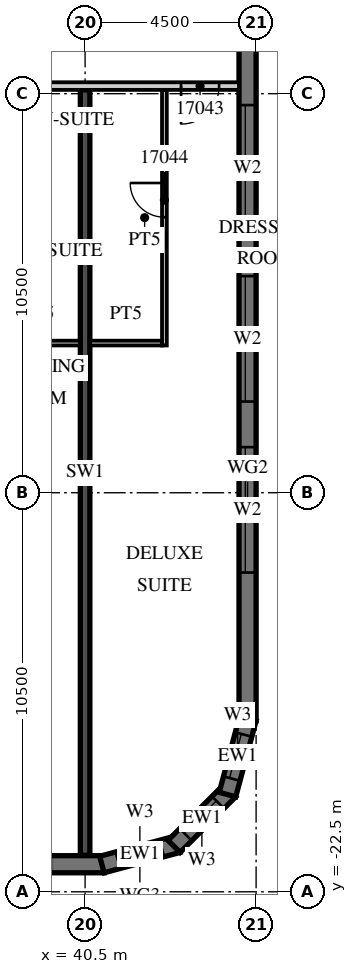
"""IFC4 building model, lengths in metres.
Left out: names, types, materials, properties, quantities, classifications, styles, units other than length and angle.
Written with IfcOpenShell. Run it as: python <this file> out.ifc"""

import sys

from ifc_helpers import new_model, si_unit, direction, frame, frame_2d, origin, place, context, subcontext, project, spatial, polyline, rectangle, outline, extrude, element, fill, save


model = new_model("IFC4")
c1 = context("Model", 3, precision=1e-05, world=origin(), true_north=direction((0.0, 1.0)))
c2 = subcontext(c1, "Body", "Model", "MODEL_VIEW")
j1 = project(units=[si_unit("LENGTHUNIT", "METRE"), si_unit("PLANEANGLEUNIT", "RADIAN")], contexts=[c1])
p1 = place(None, origin())
s1 = spatial("IfcSite", under=j1, at=p1, CompositionType="ELEMENT")
p2 = place(p1, origin())
s2 = spatial("IfcBuilding", under=s1, at=p2, CompositionType="ELEMENT")
p3 = place(p2, frame((0.0, 0.0, 86.4)))
s3 = spatial("IfcBuildingStorey", under=s2, at=p3, CompositionType="ELEMENT", Elevation=86.4)
p4 = place(p3, frame((40.5, -21.54, 0.0), z_axis=(0.0, 0.0, 1.0), x_axis=(0.0, 1.0, 0.0)))
e1 = element("IfcWall", 1, at=p4, inside=s3, PredefinedType="SHEAR", context=c2, shape_type="SweptSolid", body=[
    extrude(rectangle(XDim=20.14, YDim=0.25, at=frame_2d((10.07, 0.0))), origin(), (0.0, 0.0, 1.0), 3.3),
])
p5 = place(p3, frame((-13.5, -21.775, 0.0), z_axis=(0.0, 0.0, 1.0), x_axis=(1.0, 0.0, 0.0)))
e2 = element("IfcWall", 2, at=p5, inside=s3, PredefinedType="SOLIDWALL", context=c2, shape_type="SweptSolid", body=[
    extrude(rectangle(XDim=54.5, YDim=0.45, at=frame_2d((27.25, 0.0))), origin(), (0.0, 0.0, 1.0), 3.02),
])
p6 = place(p5, frame((0.9, 0.0, 0.45)))
e3 = element("IfcOpeningElement", 3, at=p6, cuts=e2, PredefinedType="OPENING", context=c2, shape_type="SweptSolid", body=[
    extrude(rectangle(XDim=2.7, YDim=2.25, at=frame_2d((1.35, 1.125))), frame((0.0, 0.235, 0.0), z_axis=(0.0, -1.0, 0.0), x_axis=(1.0, 0.0, 0.0)), (0.0, 0.0, 1.0), 0.47),
])
p7 = place(p5, frame((5.4, 0.0, 0.45)))
e4 = element("IfcOpeningElement", 4, at=p7, cuts=e2, PredefinedType="OPENING", context=c2, shape_type="SweptSolid", body=[
    extrude(rectangle(XDim=2.7, YDim=2.25, at=frame_2d((1.35, 1.125))), frame((0.0, 0.235, 0.0), z_axis=(0.0, -1.0, 0.0), x_axis=(1.0, 0.0, 0.0)), (0.0, 0.0, 1.0), 0.47),
])
p8 = place(p5, frame((9.9, 0.0, 0.45)))
e5 = element("IfcOpeningElement", 5, at=p8, cuts=e2, PredefinedType="OPENING", context=c2, shape_type="SweptSolid", body=[
    extrude(rectangle(XDim=2.7, YDim=2.25, at=frame_2d((1.35, 1.125))), frame((0.0, 0.235, 0.0), z_axis=(0.0, -1.0, 0.0), x_axis=(1.0, 0.0, 0.0)), (0.0, 0.0, 1.0), 0.47),
])
p9 = place(p5, frame((14.4, 0.0, 0.45)))
e6 = element("IfcOpeningElement", 6, at=p9, cuts=e2, PredefinedType="OPENING", context=c2, shape_type="SweptSolid", body=[
    extrude(rectangle(XDim=2.7, YDim=2.25, at=frame_2d((1.35, 1.125))), frame((0.0, 0.235, 0.0), z_axis=(0.0, -1.0, 0.0), x_axis=(1.0, 0.0, 0.0)), (0.0, 0.0, 1.0), 0.47),
])
p10 = place(p5, frame((18.9, 0.0, 0.45)))
e7 = element("IfcOpeningElement", 7, at=p10, cuts=e2, PredefinedType="OPENING", context=c2, shape_type="SweptSolid", body=[
    extrude(rectangle(XDim=2.7, YDim=2.25, at=frame_2d((1.35, 1.125))), frame((0.0, 0.235, 0.0), z_axis=(0.0, -1.0, 0.0), x_axis=(1.0, 0.0, 0.0)), (0.0, 0.0, 1.0), 0.47),
])
p11 = place(p5, frame((23.4, 0.0, 0.45)))
e8 = element("IfcOpeningElement", 8, at=p11, cuts=e2, PredefinedType="OPENING", context=c2, shape_type="SweptSolid", body=[
    extrude(rectangle(XDim=2.7, YDim=2.25, at=frame_2d((1.35, 1.125))), frame((0.0, 0.235, 0.0), z_axis=(0.0, -1.0, 0.0), x_axis=(1.0, 0.0, 0.0)), (0.0, 0.0, 1.0), 0.47),
])
p12 = place(p5, frame((27.9, 0.0, 0.45)))
e9 = element("IfcOpeningElement", 9, at=p12, cuts=e2, PredefinedType="OPENING", context=c2, shape_type="SweptSolid", body=[
    extrude(rectangle(XDim=2.7, YDim=2.25, at=frame_2d((1.35, 1.125))), frame((0.0, 0.235, 0.0), z_axis=(0.0, -1.0, 0.0), x_axis=(1.0, 0.0, 0.0)), (0.0, 0.0, 1.0), 0.47),
])
p13 = place(p5, frame((32.4, 0.0, 0.45)))
e10 = element("IfcOpeningElement", 10, at=p13, cuts=e2, PredefinedType="OPENING", context=c2, shape_type="SweptSolid", body=[
    extrude(rectangle(XDim=2.7, YDim=2.25, at=frame_2d((1.35, 1.125))), frame((0.0, 0.235, 0.0), z_axis=(0.0, -1.0, 0.0), x_axis=(1.0, 0.0, 0.0)), (0.0, 0.0, 1.0), 0.47),
])
p14 = place(p5, frame((36.9, 0.0, 0.45)))
e11 = element("IfcOpeningElement", 11, at=p14, cuts=e2, PredefinedType="OPENING", context=c2, shape_type="SweptSolid", body=[
    extrude(rectangle(XDim=2.7, YDim=2.25, at=frame_2d((1.35, 1.125))), frame((0.0, 0.235, 0.0), z_axis=(0.0, -1.0, 0.0), x_axis=(1.0, 0.0, 0.0)), (0.0, 0.0, 1.0), 0.47),
])
p15 = place(p5, frame((41.4, 0.0, 0.45)))
e12 = element("IfcOpeningElement", 12, at=p15, cuts=e2, PredefinedType="OPENING", context=c2, shape_type="SweptSolid", body=[
    extrude(rectangle(XDim=2.7, YDim=2.25, at=frame_2d((1.35, 1.125))), frame((0.0, 0.235, 0.0), z_axis=(0.0, -1.0, 0.0), x_axis=(1.0, 0.0, 0.0)), (0.0, 0.0, 1.0), 0.47),
])
p16 = place(p5, frame((45.9, 0.0, 0.45)))
e13 = element("IfcOpeningElement", 13, at=p16, cuts=e2, PredefinedType="OPENING", context=c2, shape_type="SweptSolid", body=[
    extrude(rectangle(XDim=2.7, YDim=2.25, at=frame_2d((1.35, 1.125))), frame((0.0, 0.235, 0.0), z_axis=(0.0, -1.0, 0.0), x_axis=(1.0, 0.0, 0.0)), (0.0, 0.0, 1.0), 0.47),
])
p17 = place(p5, frame((50.4, 0.0, 0.45)))
e14 = element("IfcOpeningElement", 14, at=p17, cuts=e2, PredefinedType="OPENING", context=c2, shape_type="SweptSolid", body=[
    extrude(rectangle(XDim=2.7, YDim=2.25, at=frame_2d((1.35, 1.125))), frame((0.0, 0.235, 0.0), z_axis=(0.0, -1.0, 0.0), x_axis=(1.0, 0.0, 0.0)), (0.0, 0.0, 1.0), 0.47),
])
p18 = place(p3, frame((40.942, -21.783, 0.0), z_axis=(0.0, 0.0, 1.0), x_axis=(0.965926999034, 0.25881466832, 0.0)))
e15 = element("IfcWall", 15, at=p18, inside=s3, PredefinedType="SOLIDWALL", context=c2, shape_type="SweptSolid", body=[
    extrude(outline(polyline([(0.0, -0.225), (2.071, -0.225), (1.95, 0.225), (0.121, 0.225), (0.0, -0.225)])), origin(), (0.0, 0.0, 1.0), 3.02),
])
p19 = place(p18, frame((0.435, 0.0, 0.45)))
e16 = element("IfcOpeningElement", 16, at=p19, cuts=e15, PredefinedType="OPENING", context=c2, shape_type="SweptSolid", body=[
    extrude(rectangle(XDim=1.2, YDim=2.25, at=frame_2d((0.6, 1.125))), frame((0.0, 0.235, 0.0), z_axis=(0.0, -1.0, 0.0), x_axis=(1.0, 0.0, 0.0)), (0.0, 0.0, 1.0), 0.47),
])
p20 = place(p3, frame((42.841, -21.305, 0.0), z_axis=(0.0, 0.0, 1.0), x_axis=(0.707106781187, 0.707106781187, 0.0)))
e17 = element("IfcWall", 17, at=p20, inside=s3, PredefinedType="SOLIDWALL", context=c2, shape_type="SweptSolid", body=[
    extrude(outline(polyline([(0.0, -0.225), (2.071, -0.225), (1.95, 0.225), (0.121, 0.225), (0.0, -0.225)])), origin(), (0.0, 0.0, 1.0), 3.02),
])
p21 = place(p20, frame((0.435, 0.0, 0.45)))
e18 = element("IfcOpeningElement", 18, at=p21, cuts=e17, PredefinedType="OPENING", context=c2, shape_type="SweptSolid", body=[
    extrude(rectangle(XDim=1.2, YDim=2.25, at=frame_2d((0.6, 1.125))), frame((0.0, 0.235, 0.0), z_axis=(0.0, -1.0, 0.0), x_axis=(1.0, 0.0, 0.0)), (0.0, 0.0, 1.0), 0.47),
])
p22 = place(p3, frame((44.247, -19.942, 0.0), z_axis=(0.0, 0.0, 1.0), x_axis=(0.25881466832, 0.965926999034, 0.0)))
e19 = element("IfcWall", 19, at=p22, inside=s3, PredefinedType="SOLIDWALL", context=c2, shape_type="SweptSolid", body=[
    extrude(outline(polyline([(-0.0, -0.225), (2.07, -0.225), (1.95, 0.225), (0.12, 0.225), (-0.0, -0.225)])), origin(), (0.0, 0.0, 1.0), 3.02),
])
p23 = place(p22, frame((0.435, 0.0, 0.45)))
e20 = element("IfcOpeningElement", 20, at=p23, cuts=e19, PredefinedType="OPENING", context=c2, shape_type="SweptSolid", body=[
    extrude(rectangle(XDim=1.2, YDim=2.25, at=frame_2d((0.6, 1.125))), frame((0.0, 0.235, 0.0), z_axis=(0.0, -1.0, 0.0), x_axis=(1.0, 0.0, 0.0)), (0.0, 0.0, 1.0), 0.47),
])
p24 = place(p3, frame((44.775, -18.0, 0.0), z_axis=(0.0, 0.0, 1.0), x_axis=(0.0, 1.0, 0.0)))
e21 = element("IfcWall", 21, at=p24, inside=s3, PredefinedType="SOLIDWALL", context=c2, shape_type="SweptSolid", body=[
    extrude(rectangle(XDim=36.0, YDim=0.45, at=frame_2d((18.0, 0.0))), origin(), (0.0, 0.0, 1.0), 3.02),
])
p25 = place(p24, frame((3.9, 0.0, 0.45)))
e22 = element("IfcOpeningElement", 22, at=p25, cuts=e21, PredefinedType="OPENING", context=c2, shape_type="SweptSolid", body=[
    extrude(rectangle(XDim=3.3, YDim=2.25, at=frame_2d((1.65, 1.125))), frame((0.0, 0.235, 0.0), z_axis=(0.0, -1.0, 0.0), x_axis=(1.0, 0.0, 0.0)), (0.0, 0.0, 1.0), 0.47),
])
p26 = place(p24, frame((8.4, 0.0, 0.45)))
e23 = element("IfcOpeningElement", 23, at=p26, cuts=e21, PredefinedType="OPENING", context=c2, shape_type="SweptSolid", body=[
    extrude(rectangle(XDim=3.3, YDim=2.25, at=frame_2d((1.65, 1.125))), frame((0.0, 0.235, 0.0), z_axis=(0.0, -1.0, 0.0), x_axis=(1.0, 0.0, 0.0)), (0.0, 0.0, 1.0), 0.47),
])
p27 = place(p24, frame((12.9, 0.0, 0.45)))
e24 = element("IfcOpeningElement", 24, at=p27, cuts=e21, PredefinedType="OPENING", context=c2, shape_type="SweptSolid", body=[
    extrude(rectangle(XDim=3.3, YDim=2.25, at=frame_2d((1.65, 1.125))), frame((0.0, 0.235, 0.0), z_axis=(0.0, -1.0, 0.0), x_axis=(1.0, 0.0, 0.0)), (0.0, 0.0, 1.0), 0.47),
])
p28 = place(p3, frame((-13.5, -1.3, 0.0), z_axis=(0.0, 0.0, 1.0), x_axis=(1.0, 0.0, 0.0)))
e25 = element("IfcWall", 25, at=p28, inside=s3, PredefinedType="PARTITIONING", context=c2, shape_type="SweptSolid", body=[
    extrude(rectangle(XDim=58.05, YDim=0.2, at=frame_2d((29.025, 0.0))), origin(), (0.0, 0.0, 1.0), 3.02),
])
p29 = place(p28, frame((2.925, 0.0, 0.0)))
e26 = element("IfcOpeningElement", 26, at=p29, cuts=e25, PredefinedType="OPENING", context=c2, shape_type="SweptSolid", body=[
    extrude(rectangle(XDim=1.0, YDim=2.1, at=frame_2d((0.5, 1.05))), frame((0.0, 0.11, 0.0), z_axis=(0.0, -1.0, 0.0), x_axis=(1.0, 0.0, 0.0)), (0.0, 0.0, 1.0), 0.22),
])
p30 = place(p28, frame((5.075, 0.0, 0.0)))
e27 = element("IfcOpeningElement", 27, at=p30, cuts=e25, PredefinedType="OPENING", context=c2, shape_type="SweptSolid", body=[
    extrude(rectangle(XDim=1.0, YDim=2.1, at=frame_2d((0.5, 1.05))), frame((0.0, 0.11, 0.0), z_axis=(0.0, -1.0, 0.0), x_axis=(1.0, 0.0, 0.0)), (0.0, 0.0, 1.0), 0.22),
])
p31 = place(p28, frame((9.55, 0.0, 0.0)))
e28 = element("IfcOpeningElement", 28, at=p31, cuts=e25, PredefinedType="OPENING", context=c2, shape_type="SweptSolid", body=[
    extrude(rectangle(XDim=1.0, YDim=2.1, at=frame_2d((0.5, 1.05))), frame((0.0, 0.11, 0.0), z_axis=(0.0, -1.0, 0.0), x_axis=(1.0, 0.0, 0.0)), (0.0, 0.0, 1.0), 0.22),
])
p32 = place(p28, frame((14.075, 0.0, 0.0)))
e29 = element("IfcOpeningElement", 29, at=p32, cuts=e25, PredefinedType="OPENING", context=c2, shape_type="SweptSolid", body=[
    extrude(rectangle(XDim=1.0, YDim=2.1, at=frame_2d((0.5, 1.05))), frame((0.0, 0.11, 0.0), z_axis=(0.0, -1.0, 0.0), x_axis=(1.0, 0.0, 0.0)), (0.0, 0.0, 1.0), 0.22),
])
p33 = place(p28, frame((20.925, 0.0, 0.0)))
e30 = element("IfcOpeningElement", 30, at=p33, cuts=e25, PredefinedType="OPENING", context=c2, shape_type="SweptSolid", body=[
    extrude(rectangle(XDim=1.0, YDim=2.1, at=frame_2d((0.5, 1.05))), frame((0.0, 0.11, 0.0), z_axis=(0.0, -1.0, 0.0), x_axis=(1.0, 0.0, 0.0)), (0.0, 0.0, 1.0), 0.22),
])
p34 = place(p28, frame((27.862, 0.0, 0.0)))
e31 = element("IfcOpeningElement", 31, at=p34, cuts=e25, PredefinedType="OPENING", context=c2, shape_type="SweptSolid", body=[
    extrude(rectangle(XDim=1.2, YDim=2.1, at=frame_2d((0.6, 1.05))), frame((0.0, 0.11, 0.0), z_axis=(0.0, -1.0, 0.0), x_axis=(1.0, 0.0, 0.0)), (0.0, 0.0, 1.0), 0.22),
])
p35 = place(p28, frame((34.45, 0.0, 0.0)))
e32 = element("IfcOpeningElement", 32, at=p35, cuts=e25, PredefinedType="OPENING", context=c2, shape_type="SweptSolid", body=[
    extrude(rectangle(XDim=1.0, YDim=2.1, at=frame_2d((0.5, 1.05))), frame((0.0, 0.11, 0.0), z_axis=(0.0, -1.0, 0.0), x_axis=(1.0, 0.0, 0.0)), (0.0, 0.0, 1.0), 0.22),
])
p36 = place(p28, frame((38.925, 0.0, 0.0)))
e33 = element("IfcOpeningElement", 33, at=p36, cuts=e25, PredefinedType="OPENING", context=c2, shape_type="SweptSolid", body=[
    extrude(rectangle(XDim=1.0, YDim=2.1, at=frame_2d((0.5, 1.05))), frame((0.0, 0.11, 0.0), z_axis=(0.0, -1.0, 0.0), x_axis=(1.0, 0.0, 0.0)), (0.0, 0.0, 1.0), 0.22),
])
p37 = place(p28, frame((41.075, 0.0, 0.0)))
e34 = element("IfcOpeningElement", 34, at=p37, cuts=e25, PredefinedType="OPENING", context=c2, shape_type="SweptSolid", body=[
    extrude(rectangle(XDim=1.0, YDim=2.1, at=frame_2d((0.5, 1.05))), frame((0.0, 0.11, 0.0), z_axis=(0.0, -1.0, 0.0), x_axis=(1.0, 0.0, 0.0)), (0.0, 0.0, 1.0), 0.22),
])
p38 = place(p28, frame((45.55, 0.0, 0.0)))
e35 = element("IfcOpeningElement", 35, at=p38, cuts=e25, PredefinedType="OPENING", context=c2, shape_type="SweptSolid", body=[
    extrude(rectangle(XDim=1.0, YDim=2.1, at=frame_2d((0.5, 1.05))), frame((0.0, 0.11, 0.0), z_axis=(0.0, -1.0, 0.0), x_axis=(1.0, 0.0, 0.0)), (0.0, 0.0, 1.0), 0.22),
])
p39 = place(p28, frame((50.075, 0.0, 0.0)))
e36 = element("IfcOpeningElement", 36, at=p39, cuts=e25, PredefinedType="OPENING", context=c2, shape_type="SweptSolid", body=[
    extrude(rectangle(XDim=1.0, YDim=2.1, at=frame_2d((0.5, 1.05))), frame((0.0, 0.11, 0.0), z_axis=(0.0, -1.0, 0.0), x_axis=(1.0, 0.0, 0.0)), (0.0, 0.0, 1.0), 0.22),
])
p40 = place(p28, frame((56.525, 0.0, 0.0)))
e37 = element("IfcOpeningElement", 37, at=p40, cuts=e25, PredefinedType="OPENING", context=c2, shape_type="SweptSolid", body=[
    extrude(rectangle(XDim=1.0, YDim=2.1, at=frame_2d((0.5, 1.05))), frame((0.0, 0.11, 0.0), z_axis=(0.0, -1.0, 0.0), x_axis=(1.0, 0.0, 0.0)), (0.0, 0.0, 1.0), 0.22),
])
p41 = place(p3, frame((38.15, -8.062, 0.0), z_axis=(0.0, 0.0, 1.0), x_axis=(1.0, 0.0, 0.0)))
e38 = element("IfcWall", 38, at=p41, inside=s3, PredefinedType="PARTITIONING", context=c2, shape_type="SweptSolid", body=[
    extrude(rectangle(XDim=2.225, YDim=0.125, at=frame_2d((1.113, 0.0))), origin(), (0.0, 0.0, 1.0), 3.02),
])
p42 = place(p3, frame((42.587, -8.125, 0.0), z_axis=(0.0, 0.0, 1.0), x_axis=(0.0, 1.0, 0.0)))
e39 = element("IfcWall", 39, at=p42, inside=s3, PredefinedType="PARTITIONING", context=c2, shape_type="SweptSolid", body=[
    extrude(rectangle(XDim=6.725, YDim=0.125, at=frame_2d((3.363, 0.0))), origin(), (0.0, 0.0, 1.0), 3.02),
])
p43 = place(p42, frame((3.375, 0.0, 0.0)))
e40 = element("IfcOpeningElement", 40, at=p43, cuts=e39, PredefinedType="OPENING", context=c2, shape_type="SweptSolid", body=[
    extrude(rectangle(XDim=0.9, YDim=2.1, at=frame_2d((0.45, 1.05))), frame((0.0, 0.073, 0.0), z_axis=(0.0, -1.0, 0.0), x_axis=(1.0, 0.0, 0.0)), (0.0, 0.0, 1.0), 0.145),
])
p44 = place(p3, frame((40.625, -8.062, 0.0), z_axis=(0.0, 0.0, 1.0), x_axis=(1.0, 0.0, 0.0)))
e41 = element("IfcWall", 41, at=p44, inside=s3, PredefinedType="PARTITIONING", context=c2, shape_type="SweptSolid", body=[
    extrude(rectangle(XDim=1.9, YDim=0.125, at=frame_2d((0.95, 0.0))), origin(), (0.0, 0.0, 1.0), 3.02),
])
p45 = place(p19, origin())
e42 = element("IfcWindow", 42, at=p45, inside=s3, PartitioningType="SINGLE_PANEL", PredefinedType="WINDOW", context=c2, shape_type="SweptSolid", body=[
    extrude(rectangle(XDim=1.2, YDim=2.25, at=frame_2d((0.6, 1.125))), frame((0.0, 0.09, 0.0), z_axis=(0.0, -1.0, 0.0), x_axis=(1.0, 0.0, 0.0)), (0.0, 0.0, 1.0), 0.06),
])
fill(e16, e42)
p46 = place(p21, origin())
e43 = element("IfcWindow", 43, at=p46, inside=s3, PartitioningType="SINGLE_PANEL", PredefinedType="WINDOW", context=c2, shape_type="SweptSolid", body=[
    extrude(rectangle(XDim=1.2, YDim=2.25, at=frame_2d((0.6, 1.125))), frame((0.0, 0.09, 0.0), z_axis=(0.0, -1.0, 0.0), x_axis=(1.0, 0.0, 0.0)), (0.0, 0.0, 1.0), 0.06),
])
fill(e18, e43)
p47 = place(p23, origin())
e44 = element("IfcWindow", 44, at=p47, inside=s3, PartitioningType="SINGLE_PANEL", PredefinedType="WINDOW", context=c2, shape_type="SweptSolid", body=[
    extrude(rectangle(XDim=1.2, YDim=2.25, at=frame_2d((0.6, 1.125))), frame((0.0, 0.09, 0.0), z_axis=(0.0, -1.0, 0.0), x_axis=(1.0, 0.0, 0.0)), (0.0, 0.0, 1.0), 0.06),
])
fill(e20, e44)
p48 = place(p25, origin())
e45 = element("IfcWindow", 45, at=p48, inside=s3, PartitioningType="SINGLE_PANEL", PredefinedType="WINDOW", context=c2, shape_type="SweptSolid", body=[
    extrude(rectangle(XDim=3.3, YDim=2.25, at=frame_2d((1.65, 1.125))), frame((0.0, 0.09, 0.0), z_axis=(0.0, -1.0, 0.0), x_axis=(1.0, 0.0, 0.0)), (0.0, 0.0, 1.0), 0.06),
])
fill(e22, e45)
p49 = place(p26, origin())
e46 = element("IfcWindow", 46, at=p49, inside=s3, PartitioningType="SINGLE_PANEL", PredefinedType="WINDOW", context=c2, shape_type="SweptSolid", body=[
    extrude(rectangle(XDim=3.3, YDim=2.25, at=frame_2d((1.65, 1.125))), frame((0.0, 0.09, 0.0), z_axis=(0.0, -1.0, 0.0), x_axis=(1.0, 0.0, 0.0)), (0.0, 0.0, 1.0), 0.06),
])
fill(e23, e46)
p50 = place(p27, origin())
e47 = element("IfcWindow", 47, at=p50, inside=s3, PartitioningType="SINGLE_PANEL", PredefinedType="WINDOW", context=c2, shape_type="SweptSolid", body=[
    extrude(rectangle(XDim=3.3, YDim=2.25, at=frame_2d((1.65, 1.125))), frame((0.0, 0.09, 0.0), z_axis=(0.0, -1.0, 0.0), x_axis=(1.0, 0.0, 0.0)), (0.0, 0.0, 1.0), 0.06),
])
fill(e24, e47)
p51 = place(p40, origin())
e48 = element("IfcDoor", 48, at=p51, inside=s3, OperationType="SINGLE_SWING_LEFT", PredefinedType="DOOR", context=c2, shape_type="SweptSolid", body=[
    extrude(rectangle(XDim=1.0, YDim=2.1, at=frame_2d((0.5, 1.05))), frame((0.0, 0.025, 0.0), z_axis=(0.0, -1.0, 0.0), x_axis=(1.0, 0.0, 0.0)), (0.0, 0.0, 1.0), 0.05),
])
fill(e37, e48)
p52 = place(p43, origin())
e49 = element("IfcDoor", 49, at=p52, inside=s3, OperationType="SINGLE_SWING_RIGHT", PredefinedType="DOOR", context=c2, shape_type="SweptSolid", body=[
    extrude(rectangle(XDim=0.9, YDim=2.1, at=frame_2d((0.45, 1.05))), frame((0.0, 0.025, 0.0), z_axis=(0.0, -1.0, 0.0), x_axis=(1.0, 0.0, 0.0)), (0.0, 0.0, 1.0), 0.05),
])
fill(e40, e49)
save(model, sys.argv[1])
